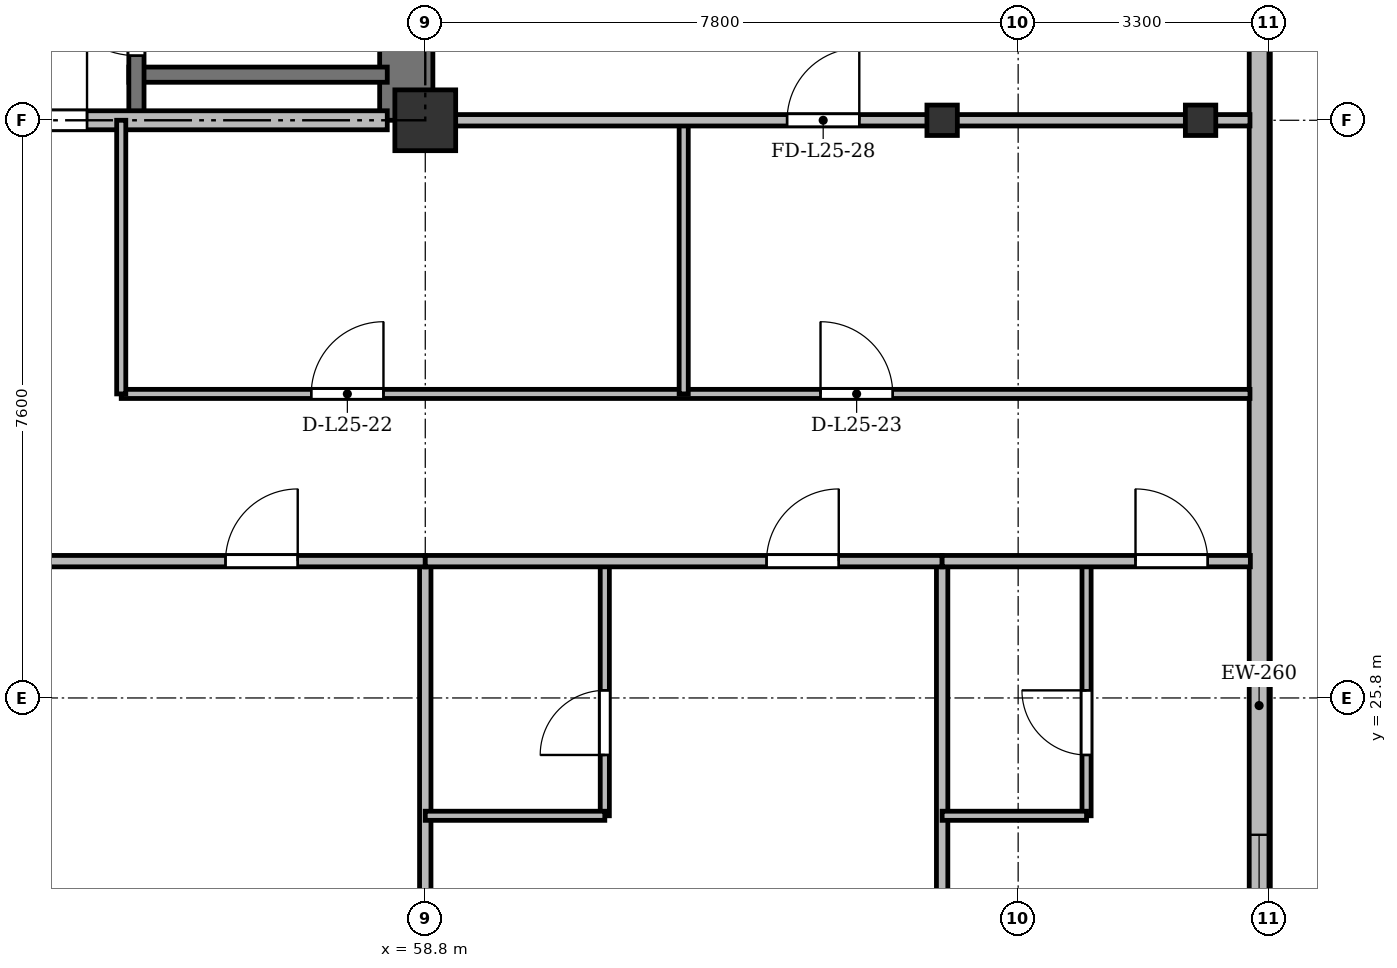
"""IFC4 building model, lengths in metres.
Left out: names, types, materials, properties, quantities, classifications, styles, units other than length and angle.
Written with IfcOpenShell. Run it as: python <this file> out.ifc"""

import sys

from ifc_helpers import new_model, si_unit, direction, frame, frame_2d, origin, origin_2d, place, context, subcontext, project, spatial, rectangle, i_section, extrude, source, transform, mapped, element, fill, save


model = new_model("IFC4")
c1 = context("Model", 3, precision=1e-05, world=origin(), true_north=direction((0.0, 1.0)))
c2 = subcontext(c1, "Body", "Model", "MODEL_VIEW")
j1 = project(units=[si_unit("LENGTHUNIT", "METRE"), si_unit("PLANEANGLEUNIT", "RADIAN")], contexts=[c1])
p1 = place(None, origin())
s1 = spatial("IfcSite", under=j1, at=p1, CompositionType="ELEMENT")
p2 = place(p1, origin())
s2 = spatial("IfcBuilding", under=s1, at=p2, CompositionType="ELEMENT")
p3 = place(p2, frame((0.0, 0.0, 99.7)))
s3 = spatial("IfcBuildingStorey", under=s2, at=p3, CompositionType="ELEMENT", Elevation=99.7)
m1 = source(origin(), c2, "Body", "SweptSolid", [
    extrude(rectangle(XDim=0.8, YDim=0.8, at=origin_2d()), origin(), (0.0, 0.0, 1.0), 3.6),
])
p4 = place(p3, frame((58.8, 33.4, 0.0), z_axis=(0.0, 0.0, 1.0), x_axis=(1.0, 0.0, 0.0)))
e1 = element("IfcColumn", 1, at=p4, inside=s3, PredefinedType="COLUMN", context=c2, shape_type="MappedRepresentation", body=[
    mapped(m1, transform((0.0, 0.0, 0.0), x_axis=(1.0, 0.0, 0.0), y_axis=(0.0, 1.0, 0.0), z_axis=(0.0, 0.0, 1.0), scale=1.0)),
])
m2 = source(origin(), c2, "Body", "SweptSolid", [
    extrude(i_section(OverallWidth=0.4, OverallDepth=0.4, WebThickness=0.022, FlangeThickness=0.035, at=origin_2d()), origin(), (0.0, 0.0, 1.0), 3.6),
])
for number, where, z_axis, x_axis in (
    (2, (65.6, 33.4, 0.0), (0.0, 0.0, 1.0), (1.0, 0.0, 0.0)),
    (3, (69.0, 33.4, 0.0), (0.0, 0.0, 1.0), (1.0, 0.0, 0.0)),
):
    element("IfcColumn", number, at=place(p3, frame(where, z_axis=z_axis, x_axis=x_axis)), inside=s3, PredefinedType="COLUMN", context=c2, shape_type="MappedRepresentation", body=[
        mapped(m2, transform((0.0, 0.0, 0.0), x_axis=(1.0, 0.0, 0.0), y_axis=(0.0, 1.0, 0.0), z_axis=(0.0, 0.0, 1.0), scale=1.0)),
    ])
p5 = place(p3, frame((69.77, 45.5, 0.0), z_axis=(0.0, 0.0, 1.0), x_axis=(0.0, -1.0, 0.0)))
e4 = element("IfcWall", 4, at=p5, inside=s3, PredefinedType="SOLIDWALL", context=c2, shape_type="SweptSolid", body=[
    extrude(rectangle(XDim=39.6, YDim=0.26, at=frame_2d((19.8, 0.0))), origin(), (0.0, 0.0, 1.0), 3.34),
])
p6 = place(p5, frame((36.95, 0.0, 0.92)))
e5 = element("IfcOpeningElement", 5, at=p6, cuts=e4, PredefinedType="OPENING", context=c2, shape_type="SweptSolid", body=[
    extrude(rectangle(XDim=1.2, YDim=1.65, at=frame_2d((0.6, 0.825))), frame((0.0, 0.14, 0.0), z_axis=(0.0, -1.0, 0.0), x_axis=(1.0, 0.0, 0.0)), (0.0, 0.0, 1.0), 0.28),
])
p7 = place(p5, frame((32.9, 0.0, 0.92)))
e6 = element("IfcOpeningElement", 6, at=p7, cuts=e4, PredefinedType="OPENING", context=c2, shape_type="SweptSolid", body=[
    extrude(rectangle(XDim=2.4, YDim=2.1, at=frame_2d((1.2, 1.05))), frame((0.0, 0.14, 0.0), z_axis=(0.0, -1.0, 0.0), x_axis=(1.0, 0.0, 0.0)), (0.0, 0.0, 1.0), 0.28),
])
p8 = place(p5, frame((28.7, 0.0, 0.92)))
e7 = element("IfcOpeningElement", 7, at=p8, cuts=e4, PredefinedType="OPENING", context=c2, shape_type="SweptSolid", body=[
    extrude(rectangle(XDim=2.4, YDim=2.1, at=frame_2d((1.2, 1.05))), frame((0.0, 0.14, 0.0), z_axis=(0.0, -1.0, 0.0), x_axis=(1.0, 0.0, 0.0)), (0.0, 0.0, 1.0), 0.28),
])
p9 = place(p5, frame((21.5, 0.0, 0.92)))
e8 = element("IfcOpeningElement", 8, at=p9, cuts=e4, PredefinedType="OPENING", context=c2, shape_type="SweptSolid", body=[
    extrude(rectangle(XDim=2.4, YDim=2.1, at=frame_2d((1.2, 1.05))), frame((0.0, 0.14, 0.0), z_axis=(0.0, -1.0, 0.0), x_axis=(1.0, 0.0, 0.0)), (0.0, 0.0, 1.0), 0.28),
])
p10 = place(p5, frame((7.5, 0.0, 0.92)))
e9 = element("IfcOpeningElement", 9, at=p10, cuts=e4, PredefinedType="OPENING", context=c2, shape_type="SweptSolid", body=[
    extrude(rectangle(XDim=2.4, YDim=2.1, at=frame_2d((1.2, 1.05))), frame((0.0, 0.14, 0.0), z_axis=(0.0, -1.0, 0.0), x_axis=(1.0, 0.0, 0.0)), (0.0, 0.0, 1.0), 0.28),
])
p11 = place(p5, frame((4.5, 0.0, 0.92)))
e10 = element("IfcOpeningElement", 10, at=p11, cuts=e4, PredefinedType="OPENING", context=c2, shape_type="SweptSolid", body=[
    extrude(rectangle(XDim=1.2, YDim=1.65, at=frame_2d((0.6, 0.825))), frame((0.0, 0.14, 0.0), z_axis=(0.0, -1.0, 0.0), x_axis=(1.0, 0.0, 0.0)), (0.0, 0.0, 1.0), 0.28),
])
p12 = place(p5, frame((1.15, 0.0, 0.92)))
e11 = element("IfcOpeningElement", 11, at=p12, cuts=e4, PredefinedType="OPENING", context=c2, shape_type="SweptSolid", body=[
    extrude(rectangle(XDim=1.2, YDim=1.65, at=frame_2d((0.6, 0.825))), frame((0.0, 0.14, 0.0), z_axis=(0.0, -1.0, 0.0), x_axis=(1.0, 0.0, 0.0)), (0.0, 0.0, 1.0), 0.28),
])
p13 = place(p3, frame((58.55, 33.4, 0.0), z_axis=(0.0, 0.0, 1.0), x_axis=(0.0, 1.0, 0.0)))
e12 = element("IfcWall", 12, at=p13, inside=s3, PredefinedType="SHEAR", context=c2, shape_type="SweptSolid", body=[
    extrude(rectangle(XDim=11.7, YDim=0.7, at=frame_2d((5.85, 0.0))), origin(), (0.0, 0.0, 1.0), 3.34),
])
p14 = place(p3, frame((54.9, 34.0, 0.0), z_axis=(0.0, 0.0, 1.0), x_axis=(1.0, 0.0, 0.0)))
e13 = element("IfcWall", 13, at=p14, inside=s3, PredefinedType="SHEAR", context=c2, shape_type="SweptSolid", body=[
    extrude(rectangle(XDim=3.4, YDim=0.2, at=frame_2d((1.7, 0.0))), origin(), (0.0, 0.0, 1.0), 3.34),
])
p15 = place(p3, frame((55.0, 33.4, 0.0), z_axis=(0.0, 0.0, 1.0), x_axis=(0.0, 1.0, 0.0)))
e14 = element("IfcWall", 14, at=p15, inside=s3, PredefinedType="SHEAR", context=c2, shape_type="SweptSolid", body=[
    extrude(rectangle(XDim=11.1, YDim=0.2, at=frame_2d((5.55, 0.0))), origin(), (0.0, 0.0, 1.0), 3.34),
])
p16 = place(p15, frame((0.85, 0.0, 0.0)))
e15 = element("IfcOpeningElement", 15, at=p16, cuts=e14, PredefinedType="OPENING", context=c2, shape_type="SweptSolid", body=[
    extrude(rectangle(XDim=1.1, YDim=2.15, at=frame_2d((0.55, 1.075))), frame((0.0, 0.11, 0.0), z_axis=(0.0, -1.0, 0.0), x_axis=(1.0, 0.0, 0.0)), (0.0, 0.0, 1.0), 0.22),
])
p17 = place(p3, frame((47.15, 33.4, 0.0), z_axis=(0.0, 0.0, 1.0), x_axis=(1.0, 0.0, 0.0)))
e16 = element("IfcWall", 16, at=p17, inside=s3, PredefinedType="PARTITIONING", context=c2, shape_type="SweptSolid", body=[
    extrude(rectangle(XDim=11.15, YDim=0.25, at=frame_2d((5.575, 0.0))), origin(), (0.0, 0.0, 1.0), 2.752),
])
p18 = place(p17, frame((0.7, 0.0, 0.0)))
e17 = element("IfcOpeningElement", 17, at=p18, cuts=e16, PredefinedType="OPENING", context=c2, shape_type="SweptSolid", body=[
    extrude(rectangle(XDim=0.95, YDim=2.15, at=frame_2d((0.475, 1.075))), frame((0.0, 0.135, 0.0), z_axis=(0.0, -1.0, 0.0), x_axis=(1.0, 0.0, 0.0)), (0.0, 0.0, 1.0), 0.27),
])
p19 = place(p17, frame((6.0, 0.0, 0.0)))
e18 = element("IfcOpeningElement", 18, at=p19, cuts=e16, PredefinedType="OPENING", context=c2, shape_type="SweptSolid", body=[
    extrude(rectangle(XDim=1.2, YDim=2.15, at=frame_2d((0.6, 1.075))), frame((0.0, 0.135, 0.0), z_axis=(0.0, -1.0, 0.0), x_axis=(1.0, 0.0, 0.0)), (0.0, 0.0, 1.0), 0.27),
])
p20 = place(p3, frame((54.8, 29.8, 0.0), z_axis=(0.0, 0.0, 1.0), x_axis=(1.0, 0.0, 0.0)))
e19 = element("IfcWall", 19, at=p20, inside=s3, PredefinedType="PARTITIONING", context=c2, shape_type="SweptSolid", body=[
    extrude(rectangle(XDim=14.85, YDim=0.12, at=frame_2d((7.425, 0.0))), origin(), (0.0, 0.0, 1.0), 2.84),
])
p21 = place(p20, frame((2.5, 0.0, 0.0)))
e20 = element("IfcOpeningElement", 20, at=p21, cuts=e19, PredefinedType="OPENING", context=c2, shape_type="SweptSolid", body=[
    extrude(rectangle(XDim=0.95, YDim=2.15, at=frame_2d((0.475, 1.075))), frame((0.0, 0.07, 0.0), z_axis=(0.0, -1.0, 0.0), x_axis=(1.0, 0.0, 0.0)), (0.0, 0.0, 1.0), 0.14),
])
p22 = place(p20, frame((9.2, 0.0, 0.0)))
e21 = element("IfcOpeningElement", 21, at=p22, cuts=e19, PredefinedType="OPENING", context=c2, shape_type="SweptSolid", body=[
    extrude(rectangle(XDim=0.95, YDim=2.15, at=frame_2d((0.475, 1.075))), frame((0.0, 0.07, 0.0), z_axis=(0.0, -1.0, 0.0), x_axis=(1.0, 0.0, 0.0)), (0.0, 0.0, 1.0), 0.14),
])
for number, where, z_axis, x_axis in (
    (22, (62.2, 29.8, 0.0), (0.0, 0.0, 1.0), (0.0, 1.0, 0.0)),
    (23, (54.8, 29.8, 0.0), (0.0, 0.0, 1.0), (0.0, 1.0, 0.0)),
):
    element("IfcWall", number, at=place(p3, frame(where, z_axis=z_axis, x_axis=x_axis)), inside=s3, PredefinedType="PARTITIONING", context=c2, shape_type="SweptSolid", body=[
        extrude(rectangle(XDim=3.6, YDim=0.12, at=frame_2d((1.8, 0.0))), origin(), (0.0, 0.0, 1.0), 2.752),
    ])
p23 = place(p3, frame((58.8, 33.4, 0.0), z_axis=(0.0, 0.0, 1.0), x_axis=(1.0, 0.0, 0.0)))
e24 = element("IfcWall", 24, at=p23, inside=s3, PredefinedType="PARTITIONING", context=c2, shape_type="SweptSolid", body=[
    extrude(rectangle(XDim=10.85, YDim=0.15, at=frame_2d((5.425, 0.0))), origin(), (0.0, 0.0, 1.0), 2.752),
])
p24 = place(p23, frame((4.76, 0.0, 0.0)))
e25 = element("IfcOpeningElement", 25, at=p24, cuts=e24, PredefinedType="OPENING", context=c2, shape_type="SweptSolid", body=[
    extrude(rectangle(XDim=0.95, YDim=2.15, at=frame_2d((0.475, 1.075))), frame((0.0, 0.085, 0.0), z_axis=(0.0, -1.0, 0.0), x_axis=(1.0, 0.0, 0.0)), (0.0, 0.0, 1.0), 0.17),
])
for number, where, z_axis, x_axis in (
    (26, (58.8, 3.145, 0.0), (0.0, 0.0, 1.0), (0.0, 1.0, 0.0)),
    (27, (65.6, 3.145, 0.0), (0.0, 0.0, 1.0), (0.0, 1.0, 0.0)),
):
    element("IfcWall", number, at=place(p3, frame(where, z_axis=z_axis, x_axis=x_axis)), inside=s3, PredefinedType="PARTITIONING", context=c2, shape_type="SweptSolid", body=[
        extrude(rectangle(XDim=24.455, YDim=0.15, at=frame_2d((12.228, 0.0))), origin(), (0.0, 0.0, 1.0), 2.84),
    ])
p25 = place(p3, frame((51.0, 27.6, 0.0), z_axis=(0.0, 0.0, 1.0), x_axis=(1.0, 0.0, 0.0)))
e28 = element("IfcWall", 28, at=p25, inside=s3, PredefinedType="PARTITIONING", context=c2, shape_type="SweptSolid", body=[
    extrude(rectangle(XDim=7.8, YDim=0.15, at=frame_2d((3.9, 0.0))), origin(), (0.0, 0.0, 1.0), 2.84),
])
p26 = place(p25, frame((5.172, 0.0, 0.0)))
e29 = element("IfcOpeningElement", 29, at=p26, cuts=e28, PredefinedType="OPENING", context=c2, shape_type="SweptSolid", body=[
    extrude(rectangle(XDim=0.95, YDim=2.15, at=frame_2d((0.475, 1.075))), frame((0.0, 0.085, 0.0), z_axis=(0.0, -1.0, 0.0), x_axis=(1.0, 0.0, 0.0)), (0.0, 0.0, 1.0), 0.17),
])
p27 = place(p3, frame((61.162, 24.25, 0.0), z_axis=(0.0, 0.0, 1.0), x_axis=(0.0, 1.0, 0.0)))
e30 = element("IfcWall", 30, at=p27, inside=s3, PredefinedType="PARTITIONING", context=c2, shape_type="SweptSolid", body=[
    extrude(rectangle(XDim=3.35, YDim=0.12, at=frame_2d((1.675, 0.0))), origin(), (0.0, 0.0, 1.0), 2.99),
])
p28 = place(p27, frame((0.8, 0.0, 0.0)))
e31 = element("IfcOpeningElement", 31, at=p28, cuts=e30, PredefinedType="OPENING", context=c2, shape_type="SweptSolid", body=[
    extrude(rectangle(XDim=0.85, YDim=2.1, at=frame_2d((0.425, 1.05))), frame((0.0, 0.07, 0.0), z_axis=(0.0, -1.0, 0.0), x_axis=(1.0, 0.0, 0.0)), (0.0, 0.0, 1.0), 0.14),
])
p29 = place(p3, frame((58.8, 24.25, 0.0), z_axis=(0.0, 0.0, 1.0), x_axis=(1.0, 0.0, 0.0)))
e32 = element("IfcWall", 32, at=p29, inside=s3, PredefinedType="PARTITIONING", context=c2, shape_type="SweptSolid", body=[
    extrude(rectangle(XDim=2.362, YDim=0.12, at=frame_2d((1.181, 0.0))), origin(), (0.0, 0.0, 1.0), 2.84),
])
p30 = place(p3, frame((58.8, 27.6, 0.0), z_axis=(0.0, 0.0, 1.0), x_axis=(1.0, 0.0, 0.0)))
e33 = element("IfcWall", 33, at=p30, inside=s3, PredefinedType="PARTITIONING", context=c2, shape_type="SweptSolid", body=[
    extrude(rectangle(XDim=6.8, YDim=0.15, at=frame_2d((3.4, 0.0))), origin(), (0.0, 0.0, 1.0), 2.84),
])
p31 = place(p30, frame((4.49, 0.0, 0.0)))
e34 = element("IfcOpeningElement", 34, at=p31, cuts=e33, PredefinedType="OPENING", context=c2, shape_type="SweptSolid", body=[
    extrude(rectangle(XDim=0.95, YDim=2.15, at=frame_2d((0.475, 1.075))), frame((0.0, 0.085, 0.0), z_axis=(0.0, -1.0, 0.0), x_axis=(1.0, 0.0, 0.0)), (0.0, 0.0, 1.0), 0.17),
])
p32 = place(p3, frame((67.5, 24.25, 0.0), z_axis=(0.0, 0.0, 1.0), x_axis=(0.0, 1.0, 0.0)))
e35 = element("IfcWall", 35, at=p32, inside=s3, PredefinedType="PARTITIONING", context=c2, shape_type="SweptSolid", body=[
    extrude(rectangle(XDim=3.35, YDim=0.12, at=frame_2d((1.675, 0.0))), origin(), (0.0, 0.0, 1.0), 2.99),
])
p33 = place(p32, frame((0.8, 0.0, 0.0)))
e36 = element("IfcOpeningElement", 36, at=p33, cuts=e35, PredefinedType="OPENING", context=c2, shape_type="SweptSolid", body=[
    extrude(rectangle(XDim=0.85, YDim=2.1, at=frame_2d((0.425, 1.05))), frame((0.0, 0.07, 0.0), z_axis=(0.0, -1.0, 0.0), x_axis=(1.0, 0.0, 0.0)), (0.0, 0.0, 1.0), 0.14),
])
p34 = place(p3, frame((65.6, 24.25, 0.0), z_axis=(0.0, 0.0, 1.0), x_axis=(1.0, 0.0, 0.0)))
e37 = element("IfcWall", 37, at=p34, inside=s3, PredefinedType="PARTITIONING", context=c2, shape_type="SweptSolid", body=[
    extrude(rectangle(XDim=1.9, YDim=0.12, at=frame_2d((0.95, 0.0))), origin(), (0.0, 0.0, 1.0), 2.84),
])
p35 = place(p3, frame((65.6, 27.6, 0.0), z_axis=(0.0, 0.0, 1.0), x_axis=(1.0, 0.0, 0.0)))
e38 = element("IfcWall", 38, at=p35, inside=s3, PredefinedType="PARTITIONING", context=c2, shape_type="SweptSolid", body=[
    extrude(rectangle(XDim=4.055, YDim=0.15, at=frame_2d((2.027, 0.0))), origin(), (0.0, 0.0, 1.0), 2.84),
])
p36 = place(p35, frame((2.544, 0.0, 0.0)))
e39 = element("IfcOpeningElement", 39, at=p36, cuts=e38, PredefinedType="OPENING", context=c2, shape_type="SweptSolid", body=[
    extrude(rectangle(XDim=0.95, YDim=2.15, at=frame_2d((0.475, 1.075))), frame((0.0, 0.085, 0.0), z_axis=(0.0, -1.0, 0.0), x_axis=(1.0, 0.0, 0.0)), (0.0, 0.0, 1.0), 0.17),
])
m3 = source(origin(), c2, "Body", "SweptSolid", [
    extrude(rectangle(XDim=2.4, YDim=2.1, at=frame_2d((1.2, 1.05))), frame((0.0, 0.03, 0.0), z_axis=(0.0, -1.0, 0.0), x_axis=(1.0, 0.0, 0.0)), (0.0, 0.0, 1.0), 0.06),
])
p37 = place(p9, origin())
e40 = element("IfcWindow", 40, at=p37, inside=s3, PartitioningType="SINGLE_PANEL", PredefinedType="WINDOW", context=c2, shape_type="MappedRepresentation", body=[
    mapped(m3, transform((0.0, 0.0, 0.0), x_axis=(1.0, 0.0, 0.0), y_axis=(0.0, 1.0, 0.0), z_axis=(0.0, 0.0, 1.0), scale=1.0)),
])
fill(e8, e40)
m4 = source(origin(), c2, "Body", "SweptSolid", [
    extrude(rectangle(XDim=1.1, YDim=2.15, at=frame_2d((0.55, 1.075))), frame((0.0, 0.025, 0.0), z_axis=(0.0, -1.0, 0.0), x_axis=(1.0, 0.0, 0.0)), (0.0, 0.0, 1.0), 0.05),
])
p38 = place(p16, origin())
e41 = element("IfcDoor", 41, at=p38, inside=s3, OperationType="SINGLE_SWING_RIGHT", PredefinedType="DOOR", context=c2, shape_type="MappedRepresentation", body=[
    mapped(m4, transform((0.0, 0.0, 0.0), x_axis=(1.0, 0.0, 0.0), y_axis=(0.0, 1.0, 0.0), z_axis=(0.0, 0.0, 1.0), scale=1.0)),
])
fill(e15, e41)
m5 = source(origin(), c2, "Body", "SweptSolid", [
    extrude(rectangle(XDim=1.2, YDim=2.15, at=frame_2d((0.6, 1.075))), frame((0.0, 0.025, 0.0), z_axis=(0.0, -1.0, 0.0), x_axis=(1.0, 0.0, 0.0)), (0.0, 0.0, 1.0), 0.05),
])
p39 = place(p19, origin())
e42 = element("IfcDoor", 42, at=p39, inside=s3, OperationType="SINGLE_SWING_RIGHT", PredefinedType="DOOR", context=c2, shape_type="MappedRepresentation", body=[
    mapped(m5, transform((0.0, 0.0, 0.0), x_axis=(1.0, 0.0, 0.0), y_axis=(0.0, 1.0, 0.0), z_axis=(0.0, 0.0, 1.0), scale=1.0)),
])
fill(e18, e42)
m6 = source(origin(), c2, "Body", "SweptSolid", [
    extrude(rectangle(XDim=0.95, YDim=2.15, at=frame_2d((0.475, 1.075))), frame((0.0, 0.025, 0.0), z_axis=(0.0, -1.0, 0.0), x_axis=(1.0, 0.0, 0.0)), (0.0, 0.0, 1.0), 0.05),
])
p40 = place(p21, origin())
e43 = element("IfcDoor", 43, at=p40, inside=s3, OperationType="SINGLE_SWING_RIGHT", PredefinedType="DOOR", context=c2, shape_type="MappedRepresentation", body=[
    mapped(m6, transform((0.0, 0.0, 0.0), x_axis=(1.0, 0.0, 0.0), y_axis=(0.0, 1.0, 0.0), z_axis=(0.0, 0.0, 1.0), scale=1.0)),
])
fill(e20, e43)
p41 = place(p22, origin())
e44 = element("IfcDoor", 44, at=p41, inside=s3, OperationType="SINGLE_SWING_LEFT", PredefinedType="DOOR", context=c2, shape_type="MappedRepresentation", body=[
    mapped(m6, transform((0.0, 0.0, 0.0), x_axis=(1.0, 0.0, 0.0), y_axis=(0.0, 1.0, 0.0), z_axis=(0.0, 0.0, 1.0), scale=1.0)),
])
fill(e21, e44)
p42 = place(p24, origin())
e45 = element("IfcDoor", 45, at=p42, inside=s3, OperationType="SINGLE_SWING_RIGHT", PredefinedType="DOOR", context=c2, shape_type="MappedRepresentation", body=[
    mapped(m6, transform((0.0, 0.0, 0.0), x_axis=(1.0, 0.0, 0.0), y_axis=(0.0, 1.0, 0.0), z_axis=(0.0, 0.0, 1.0), scale=1.0)),
])
fill(e25, e45)
p43 = place(p26, origin())
e46 = element("IfcDoor", 46, at=p43, inside=s3, OperationType="SINGLE_SWING_RIGHT", PredefinedType="DOOR", context=c2, shape_type="MappedRepresentation", body=[
    mapped(m6, transform((0.0, 0.0, 0.0), x_axis=(1.0, 0.0, 0.0), y_axis=(0.0, 1.0, 0.0), z_axis=(0.0, 0.0, 1.0), scale=1.0)),
])
fill(e29, e46)
m7 = source(origin(), c2, "Body", "SweptSolid", [
    extrude(rectangle(XDim=0.85, YDim=2.1, at=frame_2d((0.425, 1.05))), frame((0.0, 0.025, 0.0), z_axis=(0.0, -1.0, 0.0), x_axis=(1.0, 0.0, 0.0)), (0.0, 0.0, 1.0), 0.05),
])
p44 = place(p28, origin())
e47 = element("IfcDoor", 47, at=p44, inside=s3, OperationType="SINGLE_SWING_LEFT", PredefinedType="DOOR", context=c2, shape_type="MappedRepresentation", body=[
    mapped(m7, transform((0.0, 0.0, 0.0), x_axis=(1.0, 0.0, 0.0), y_axis=(0.0, 1.0, 0.0), z_axis=(0.0, 0.0, 1.0), scale=1.0)),
])
fill(e31, e47)
p45 = place(p31, origin())
e48 = element("IfcDoor", 48, at=p45, inside=s3, OperationType="SINGLE_SWING_RIGHT", PredefinedType="DOOR", context=c2, shape_type="MappedRepresentation", body=[
    mapped(m6, transform((0.0, 0.0, 0.0), x_axis=(1.0, 0.0, 0.0), y_axis=(0.0, 1.0, 0.0), z_axis=(0.0, 0.0, 1.0), scale=1.0)),
])
fill(e34, e48)
p46 = place(p33, origin())
e49 = element("IfcDoor", 49, at=p46, inside=s3, OperationType="SINGLE_SWING_RIGHT", PredefinedType="DOOR", context=c2, shape_type="MappedRepresentation", body=[
    mapped(m7, transform((0.0, 0.0, 0.0), x_axis=(1.0, 0.0, 0.0), y_axis=(0.0, 1.0, 0.0), z_axis=(0.0, 0.0, 1.0), scale=1.0)),
])
fill(e36, e49)
p47 = place(p36, origin())
e50 = element("IfcDoor", 50, at=p47, inside=s3, OperationType="SINGLE_SWING_LEFT", PredefinedType="DOOR", context=c2, shape_type="MappedRepresentation", body=[
    mapped(m6, transform((0.0, 0.0, 0.0), x_axis=(1.0, 0.0, 0.0), y_axis=(0.0, 1.0, 0.0), z_axis=(0.0, 0.0, 1.0), scale=1.0)),
])
fill(e39, e50)
save(model, sys.argv[1])
